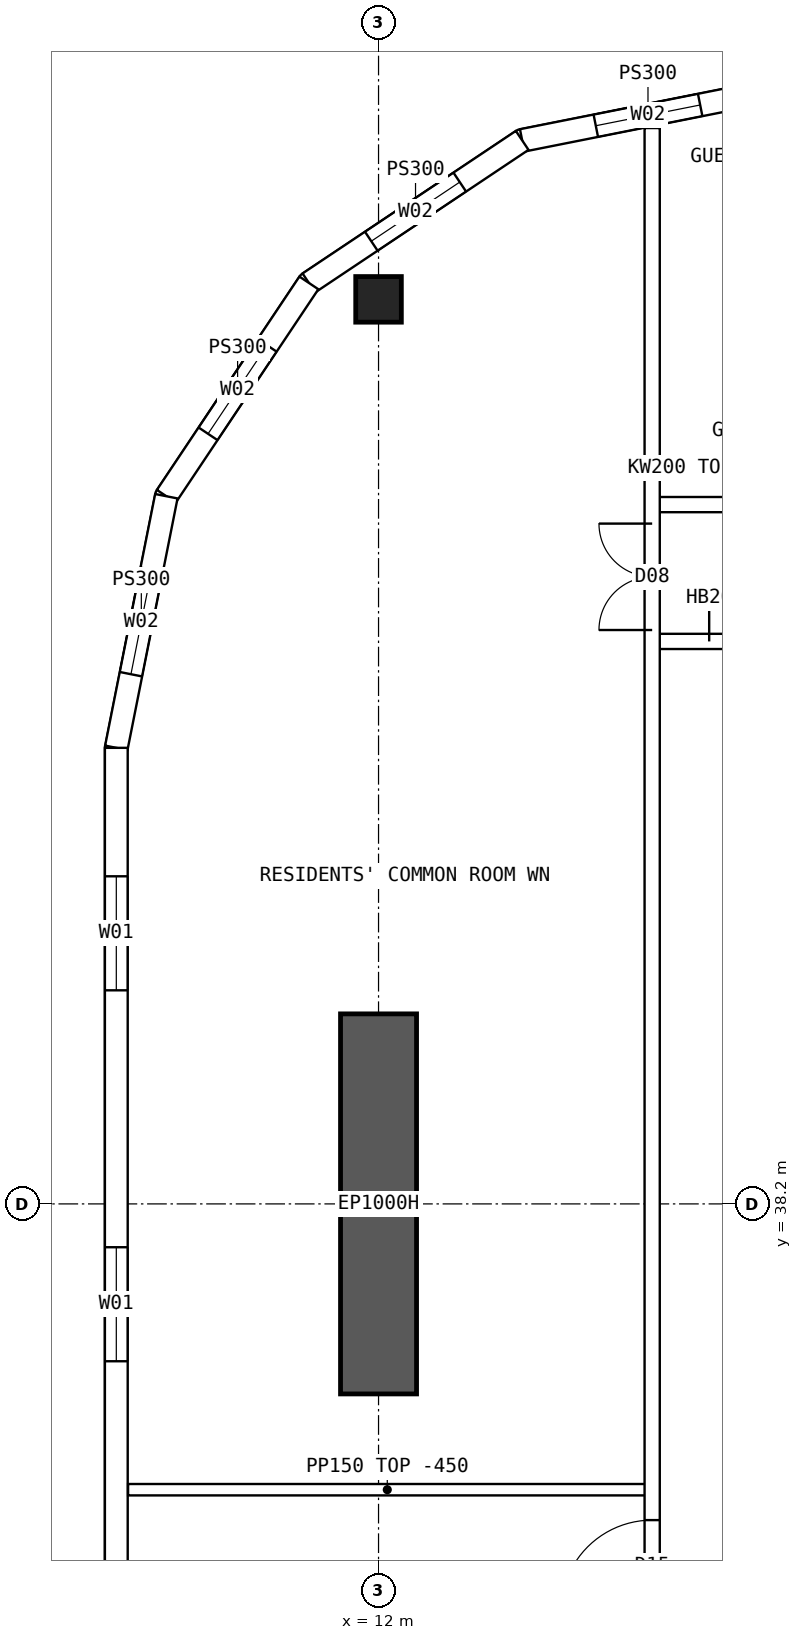
"""IFC4 building model, lengths in metres.
Left out: names, types, materials, properties, quantities, classifications, styles, units other than length and angle.
Written with IfcOpenShell. Run it as: python <this file> out.ifc"""

import sys

from ifc_helpers import new_model, si_unit, direction, frame, frame_2d, origin, origin_2d, place, context, subcontext, project, spatial, polyline, rectangle, hollow_rectangle, outline, extrude, element, fill, save


model = new_model("IFC4")
c1 = context("Model", 3, precision=1e-05, world=origin(), true_north=direction((0.0, 1.0)))
c2 = subcontext(c1, "Body", "Model", "MODEL_VIEW")
j1 = project(units=[si_unit("LENGTHUNIT", "METRE"), si_unit("PLANEANGLEUNIT", "RADIAN")], contexts=[c1])
p1 = place(None, origin())
s1 = spatial("IfcSite", under=j1, at=p1, CompositionType="ELEMENT")
p2 = place(p1, origin())
s2 = spatial("IfcBuilding", under=s1, at=p2, CompositionType="ELEMENT")
p3 = place(p2, frame((0.0, 0.0, 242.8)))
s3 = spatial("IfcBuildingStorey", under=s2, at=p3, CompositionType="ELEMENT", Elevation=242.8)
p4 = place(p3, frame((12.0, 50.1, 0.0), z_axis=(0.0, 0.0, 1.0), x_axis=(1.0, 0.0, 0.0)))
e1 = element("IfcColumn", 1, at=p4, inside=s3, PredefinedType="COLUMN", context=c2, shape_type="SweptSolid", body=[
    extrude(hollow_rectangle(XDim=0.6, YDim=0.6, WallThickness=0.06, at=origin_2d()), origin(), (0.0, 0.0, 1.0), 3.75),
])
p5 = place(p3, frame((12.0, 35.7, 0.0), z_axis=(0.0, 0.0, 1.0), x_axis=(0.0, 1.0, 0.0)))
e2 = element("IfcWall", 2, at=p5, inside=s3, PredefinedType="SHEAR", context=c2, shape_type="SweptSolid", body=[
    extrude(rectangle(XDim=5.0, YDim=1.0, at=frame_2d((2.5, 0.0))), origin(), (0.0, 0.0, 1.0), 3.75),
])
p6 = place(p3, frame((8.55, 44.2, 0.0), z_axis=(0.0, 0.0, 1.0), x_axis=(0.0, -1.0, 0.0)))
e3 = element("IfcWall", 3, at=p6, inside=s3, PredefinedType="SOLIDWALL", context=c2, shape_type="SweptSolid", body=[
    extrude(outline(polyline([(-0.015, -0.15), (24.415, -0.15), (24.385, 0.15), (0.015, 0.15), (-0.015, -0.15)])), origin(), (0.0, 0.0, 1.0), 3.3),
])
p7 = place(p6, frame((1.69, 0.0, 0.9)))
e4 = element("IfcOpeningElement", 4, at=p7, cuts=e3, PredefinedType="OPENING", context=c2, shape_type="SweptSolid", body=[
    extrude(rectangle(XDim=1.5, YDim=2.0, at=frame_2d((0.75, 1.0))), frame((0.0, 0.16, 0.0), z_axis=(0.0, -1.0, 0.0), x_axis=(1.0, 0.0, 0.0)), (0.0, 0.0, 1.0), 0.32),
])
p8 = place(p6, frame((6.57, 0.0, 0.9)))
e5 = element("IfcOpeningElement", 5, at=p8, cuts=e3, PredefinedType="OPENING", context=c2, shape_type="SweptSolid", body=[
    extrude(rectangle(XDim=1.5, YDim=2.0, at=frame_2d((0.75, 1.0))), frame((0.0, 0.16, 0.0), z_axis=(0.0, -1.0, 0.0), x_axis=(1.0, 0.0, 0.0)), (0.0, 0.0, 1.0), 0.32),
])
p9 = place(p6, frame((11.45, 0.0, 0.9)))
e6 = element("IfcOpeningElement", 6, at=p9, cuts=e3, PredefinedType="OPENING", context=c2, shape_type="SweptSolid", body=[
    extrude(rectangle(XDim=1.5, YDim=2.0, at=frame_2d((0.75, 1.0))), frame((0.0, 0.16, 0.0), z_axis=(0.0, -1.0, 0.0), x_axis=(1.0, 0.0, 0.0)), (0.0, 0.0, 1.0), 0.32),
])
p10 = place(p6, frame((16.33, 0.0, 0.9)))
e7 = element("IfcOpeningElement", 7, at=p10, cuts=e3, PredefinedType="OPENING", context=c2, shape_type="SweptSolid", body=[
    extrude(rectangle(XDim=1.5, YDim=2.0, at=frame_2d((0.75, 1.0))), frame((0.0, 0.16, 0.0), z_axis=(0.0, -1.0, 0.0), x_axis=(1.0, 0.0, 0.0)), (0.0, 0.0, 1.0), 0.32),
])
p11 = place(p6, frame((21.21, 0.0, 0.9)))
e8 = element("IfcOpeningElement", 8, at=p11, cuts=e3, PredefinedType="OPENING", context=c2, shape_type="SweptSolid", body=[
    extrude(rectangle(XDim=1.5, YDim=2.0, at=frame_2d((0.75, 1.0))), frame((0.0, 0.16, 0.0), z_axis=(0.0, -1.0, 0.0), x_axis=(1.0, 0.0, 0.0)), (0.0, 0.0, 1.0), 0.32),
])
p12 = place(p3, frame((17.2, 52.85, 0.0), z_axis=(0.0, 0.0, 1.0), x_axis=(-0.98078325777, -0.195100490205, 0.0)))
e9 = element("IfcWall", 9, at=p12, inside=s3, PredefinedType="SOLIDWALL", context=c2, shape_type="SweptSolid", body=[
    extrude(outline(polyline([(-0.03, -0.15), (3.405, -0.15), (3.345, 0.15), (0.03, 0.15), (-0.03, -0.15)])), origin(), (0.0, 0.0, 1.0), 3.3),
])
p13 = place(p12, frame((0.988, 0.0, 0.9)))
e10 = element("IfcOpeningElement", 10, at=p13, cuts=e9, PredefinedType="OPENING", context=c2, shape_type="SweptSolid", body=[
    extrude(rectangle(XDim=1.4, YDim=1.8, at=frame_2d((0.7, 0.9))), frame((0.0, 0.16, 0.0), z_axis=(0.0, -1.0, 0.0), x_axis=(1.0, 0.0, 0.0)), (0.0, 0.0, 1.0), 0.32),
])
p14 = place(p3, frame((13.89, 52.192, 0.0), z_axis=(0.0, 0.0, 1.0), x_axis=(-0.831460037396, -0.555584562613, 0.0)))
e11 = element("IfcWall", 11, at=p14, inside=s3, PredefinedType="SOLIDWALL", context=c2, shape_type="SweptSolid", body=[
    extrude(outline(polyline([(-0.03, -0.15), (3.405, -0.15), (3.345, 0.15), (0.03, 0.15), (-0.03, -0.15)])), origin(), (0.0, 0.0, 1.0), 3.3),
])
p15 = place(p14, frame((0.988, 0.0, 0.9)))
e12 = element("IfcOpeningElement", 12, at=p15, cuts=e11, PredefinedType="OPENING", context=c2, shape_type="SweptSolid", body=[
    extrude(rectangle(XDim=1.4, YDim=1.8, at=frame_2d((0.7, 0.9))), frame((0.0, 0.16, 0.0), z_axis=(0.0, -1.0, 0.0), x_axis=(1.0, 0.0, 0.0)), (0.0, 0.0, 1.0), 0.32),
])
p16 = place(p3, frame((11.083, 50.316, 0.0), z_axis=(0.0, 0.0, 1.0), x_axis=(-0.555567969291, -0.831471124873, 0.0)))
e13 = element("IfcWall", 13, at=p16, inside=s3, PredefinedType="SOLIDWALL", context=c2, shape_type="SweptSolid", body=[
    extrude(outline(polyline([(-0.03, -0.15), (3.405, -0.15), (3.345, 0.15), (0.03, 0.15), (-0.03, -0.15)])), origin(), (0.0, 0.0, 1.0), 3.3),
])
p17 = place(p16, frame((0.988, 0.0, 0.9)))
e14 = element("IfcOpeningElement", 14, at=p17, cuts=e13, PredefinedType="OPENING", context=c2, shape_type="SweptSolid", body=[
    extrude(rectangle(XDim=1.4, YDim=1.8, at=frame_2d((0.7, 0.9))), frame((0.0, 0.16, 0.0), z_axis=(0.0, -1.0, 0.0), x_axis=(1.0, 0.0, 0.0)), (0.0, 0.0, 1.0), 0.32),
])
p18 = place(p3, frame((9.208, 47.51, 0.0), z_axis=(0.0, 0.0, 1.0), x_axis=(-0.19508664885, -0.980786011034, 0.0)))
e15 = element("IfcWall", 15, at=p18, inside=s3, PredefinedType="SOLIDWALL", context=c2, shape_type="SweptSolid", body=[
    extrude(outline(polyline([(-0.03, -0.15), (3.39, -0.15), (3.36, 0.15), (0.03, 0.15), (-0.03, -0.15)])), origin(), (0.0, 0.0, 1.0), 3.3),
])
p19 = place(p18, frame((0.988, 0.0, 0.9)))
e16 = element("IfcOpeningElement", 16, at=p19, cuts=e15, PredefinedType="OPENING", context=c2, shape_type="SweptSolid", body=[
    extrude(rectangle(XDim=1.4, YDim=1.8, at=frame_2d((0.7, 0.9))), frame((0.0, 0.16, 0.0), z_axis=(0.0, -1.0, 0.0), x_axis=(1.0, 0.0, 0.0)), (0.0, 0.0, 1.0), 0.32),
])
p20 = place(p3, frame((15.6, 47.4, 0.0), z_axis=(0.0, 0.0, 1.0), x_axis=(1.0, 0.0, 0.0)))
e17 = element("IfcWall", 17, at=p20, inside=s3, PredefinedType="SOLIDWALL", context=c2, shape_type="SweptSolid", body=[
    extrude(rectangle(XDim=2.05, YDim=0.2, at=frame_2d((1.025, 0.0))), origin(), (0.0, 0.0, 1.0), 3.3),
])
p21 = place(p20, frame((0.95, 0.0, 0.0)))
e18 = element("IfcOpeningElement", 18, at=p21, cuts=e17, PredefinedType="OPENING", context=c2, shape_type="SweptSolid", body=[
    extrude(rectangle(XDim=0.9, YDim=2.1, at=frame_2d((0.45, 1.05))), frame((0.0, 0.11, 0.0), z_axis=(0.0, -1.0, 0.0), x_axis=(1.0, 0.0, 0.0)), (0.0, 0.0, 1.0), 0.22),
])
p22 = place(p3, frame((15.6, 45.6, 0.0), z_axis=(0.0, 0.0, 1.0), x_axis=(1.0, 0.0, 0.0)))
e19 = element("IfcWall", 19, at=p22, inside=s3, PredefinedType="SOLIDWALL", context=c2, shape_type="SweptSolid", body=[
    extrude(rectangle(XDim=2.05, YDim=0.2, at=frame_2d((1.025, 0.0))), origin(), (0.0, 0.0, 1.0), 2.7),
])
p23 = place(p22, frame((0.75, 0.0, 0.0)))
e20 = element("IfcOpeningElement", 20, at=p23, cuts=e19, PredefinedType="OPENING", context=c2, shape_type="SweptSolid", body=[
    extrude(rectangle(XDim=1.2, YDim=2.1, at=frame_2d((0.6, 1.05))), frame((0.0, 0.11, 0.0), z_axis=(0.0, -1.0, 0.0), x_axis=(1.0, 0.0, 0.0)), (0.0, 0.0, 1.0), 0.22),
])
p24 = place(p3, frame((15.6, 11.646, 0.0), z_axis=(0.0, 0.0, 1.0), x_axis=(0.0, 1.0, 0.0)))
e21 = element("IfcWall", 21, at=p24, inside=s3, PredefinedType="SOLIDWALL", context=c2, shape_type="SweptSolid", body=[
    extrude(rectangle(XDim=40.708, YDim=0.2, at=frame_2d((20.354, 0.0))), origin(), (0.0, 0.0, 1.0), 3.3),
])
p25 = place(p24, frame((21.194, 0.0, 0.0)))
e22 = element("IfcOpeningElement", 22, at=p25, cuts=e21, PredefinedType="OPENING", context=c2, shape_type="SweptSolid", body=[
    extrude(rectangle(XDim=1.2, YDim=2.1, at=frame_2d((0.6, 1.05))), frame((0.0, 0.11, 0.0), z_axis=(0.0, -1.0, 0.0), x_axis=(1.0, 0.0, 0.0)), (0.0, 0.0, 1.0), 0.22),
])
p26 = place(p24, frame((5.104, 0.0, 0.0)))
e23 = element("IfcOpeningElement", 23, at=p26, cuts=e21, PredefinedType="OPENING", context=c2, shape_type="SweptSolid", body=[
    extrude(rectangle(XDim=1.4, YDim=2.1, at=frame_2d((0.7, 1.05))), frame((0.0, 0.11, 0.0), z_axis=(0.0, -1.0, 0.0), x_axis=(1.0, 0.0, 0.0)), (0.0, 0.0, 1.0), 0.22),
])
p27 = place(p24, frame((34.104, 0.0, 0.0)))
e24 = element("IfcOpeningElement", 24, at=p27, cuts=e21, PredefinedType="OPENING", context=c2, shape_type="SweptSolid", body=[
    extrude(rectangle(XDim=1.4, YDim=2.1, at=frame_2d((0.7, 1.05))), frame((0.0, 0.11, 0.0), z_axis=(0.0, -1.0, 0.0), x_axis=(1.0, 0.0, 0.0)), (0.0, 0.0, 1.0), 0.22),
])
p28 = place(p3, frame((8.705, 34.44, 0.0), z_axis=(0.0, 0.0, 1.0), x_axis=(1.0, 0.0, 0.0)))
e25 = element("IfcWall", 25, at=p28, inside=s3, PredefinedType="PARTITIONING", context=c2, shape_type="SweptSolid", body=[
    extrude(outline(polyline([(0.0, 0.0), (6.82, 0.0), (6.82, 3.3), (3.597, 3.3), (3.595, 2.85), (2.997, 2.85), (2.995, 3.3), (0.0, 3.3), (0.0, 0.0)])), frame((0.0, 0.075, 0.0), z_axis=(0.0, -1.0, 0.0), x_axis=(1.0, 0.0, 0.0)), (0.0, 0.0, 1.0), 0.15),
])
p29 = place(p7, origin())
e26 = element("IfcWindow", 26, at=p29, inside=s3, PartitioningType="SINGLE_PANEL", PredefinedType="WINDOW", context=c2, shape_type="SweptSolid", body=[
    extrude(rectangle(XDim=1.5, YDim=2.0, at=frame_2d((0.75, 1.0))), frame((0.0, 0.03, 0.0), z_axis=(0.0, -1.0, 0.0), x_axis=(1.0, 0.0, 0.0)), (0.0, 0.0, 1.0), 0.06),
])
fill(e4, e26)
p30 = place(p8, origin())
e27 = element("IfcWindow", 27, at=p30, inside=s3, PartitioningType="SINGLE_PANEL", PredefinedType="WINDOW", context=c2, shape_type="SweptSolid", body=[
    extrude(rectangle(XDim=1.5, YDim=2.0, at=frame_2d((0.75, 1.0))), frame((0.0, 0.03, 0.0), z_axis=(0.0, -1.0, 0.0), x_axis=(1.0, 0.0, 0.0)), (0.0, 0.0, 1.0), 0.06),
])
fill(e5, e27)
p31 = place(p13, origin())
e28 = element("IfcWindow", 28, at=p31, inside=s3, PartitioningType="SINGLE_PANEL", PredefinedType="WINDOW", context=c2, shape_type="SweptSolid", body=[
    extrude(rectangle(XDim=1.4, YDim=1.8, at=frame_2d((0.7, 0.9))), frame((0.0, 0.03, 0.0), z_axis=(0.0, -1.0, 0.0), x_axis=(1.0, 0.0, 0.0)), (0.0, 0.0, 1.0), 0.06),
])
fill(e10, e28)
p32 = place(p15, origin())
e29 = element("IfcWindow", 29, at=p32, inside=s3, PartitioningType="SINGLE_PANEL", PredefinedType="WINDOW", context=c2, shape_type="SweptSolid", body=[
    extrude(rectangle(XDim=1.4, YDim=1.8, at=frame_2d((0.7, 0.9))), frame((0.0, 0.03, 0.0), z_axis=(0.0, -1.0, 0.0), x_axis=(1.0, 0.0, 0.0)), (0.0, 0.0, 1.0), 0.06),
])
fill(e12, e29)
p33 = place(p17, origin())
e30 = element("IfcWindow", 30, at=p33, inside=s3, PartitioningType="SINGLE_PANEL", PredefinedType="WINDOW", context=c2, shape_type="SweptSolid", body=[
    extrude(rectangle(XDim=1.4, YDim=1.8, at=frame_2d((0.7, 0.9))), frame((0.0, 0.03, 0.0), z_axis=(0.0, -1.0, 0.0), x_axis=(1.0, 0.0, 0.0)), (0.0, 0.0, 1.0), 0.06),
])
fill(e14, e30)
p34 = place(p19, origin())
e31 = element("IfcWindow", 31, at=p34, inside=s3, PartitioningType="SINGLE_PANEL", PredefinedType="WINDOW", context=c2, shape_type="SweptSolid", body=[
    extrude(rectangle(XDim=1.4, YDim=1.8, at=frame_2d((0.7, 0.9))), frame((0.0, 0.03, 0.0), z_axis=(0.0, -1.0, 0.0), x_axis=(1.0, 0.0, 0.0)), (0.0, 0.0, 1.0), 0.06),
])
fill(e16, e31)
p35 = place(p23, origin())
e32 = element("IfcDoor", 32, at=p35, inside=s3, OperationType="DOUBLE_DOOR_SINGLE_SWING", PredefinedType="DOOR", context=c2, shape_type="SweptSolid", body=[
    extrude(rectangle(XDim=1.2, YDim=2.1, at=frame_2d((0.6, 1.05))), frame((0.0, 0.025, 0.0), z_axis=(0.0, -1.0, 0.0), x_axis=(1.0, 0.0, 0.0)), (0.0, 0.0, 1.0), 0.05),
])
fill(e20, e32)
p36 = place(p25, origin())
e33 = element("IfcDoor", 33, at=p36, inside=s3, OperationType="SINGLE_SWING_LEFT", PredefinedType="DOOR", context=c2, shape_type="SweptSolid", body=[
    extrude(rectangle(XDim=1.2, YDim=2.1, at=frame_2d((0.6, 1.05))), frame((0.0, 0.025, 0.0), z_axis=(0.0, -1.0, 0.0), x_axis=(1.0, 0.0, 0.0)), (0.0, 0.0, 1.0), 0.05),
])
fill(e22, e33)
p37 = place(p27, origin())
e34 = element("IfcDoor", 34, at=p37, inside=s3, OperationType="DOUBLE_DOOR_SINGLE_SWING", PredefinedType="DOOR", context=c2, shape_type="SweptSolid", body=[
    extrude(rectangle(XDim=1.4, YDim=2.1, at=frame_2d((0.7, 1.05))), frame((0.0, 0.025, 0.0), z_axis=(0.0, -1.0, 0.0), x_axis=(1.0, 0.0, 0.0)), (0.0, 0.0, 1.0), 0.05),
])
fill(e24, e34)
save(model, sys.argv[1])
